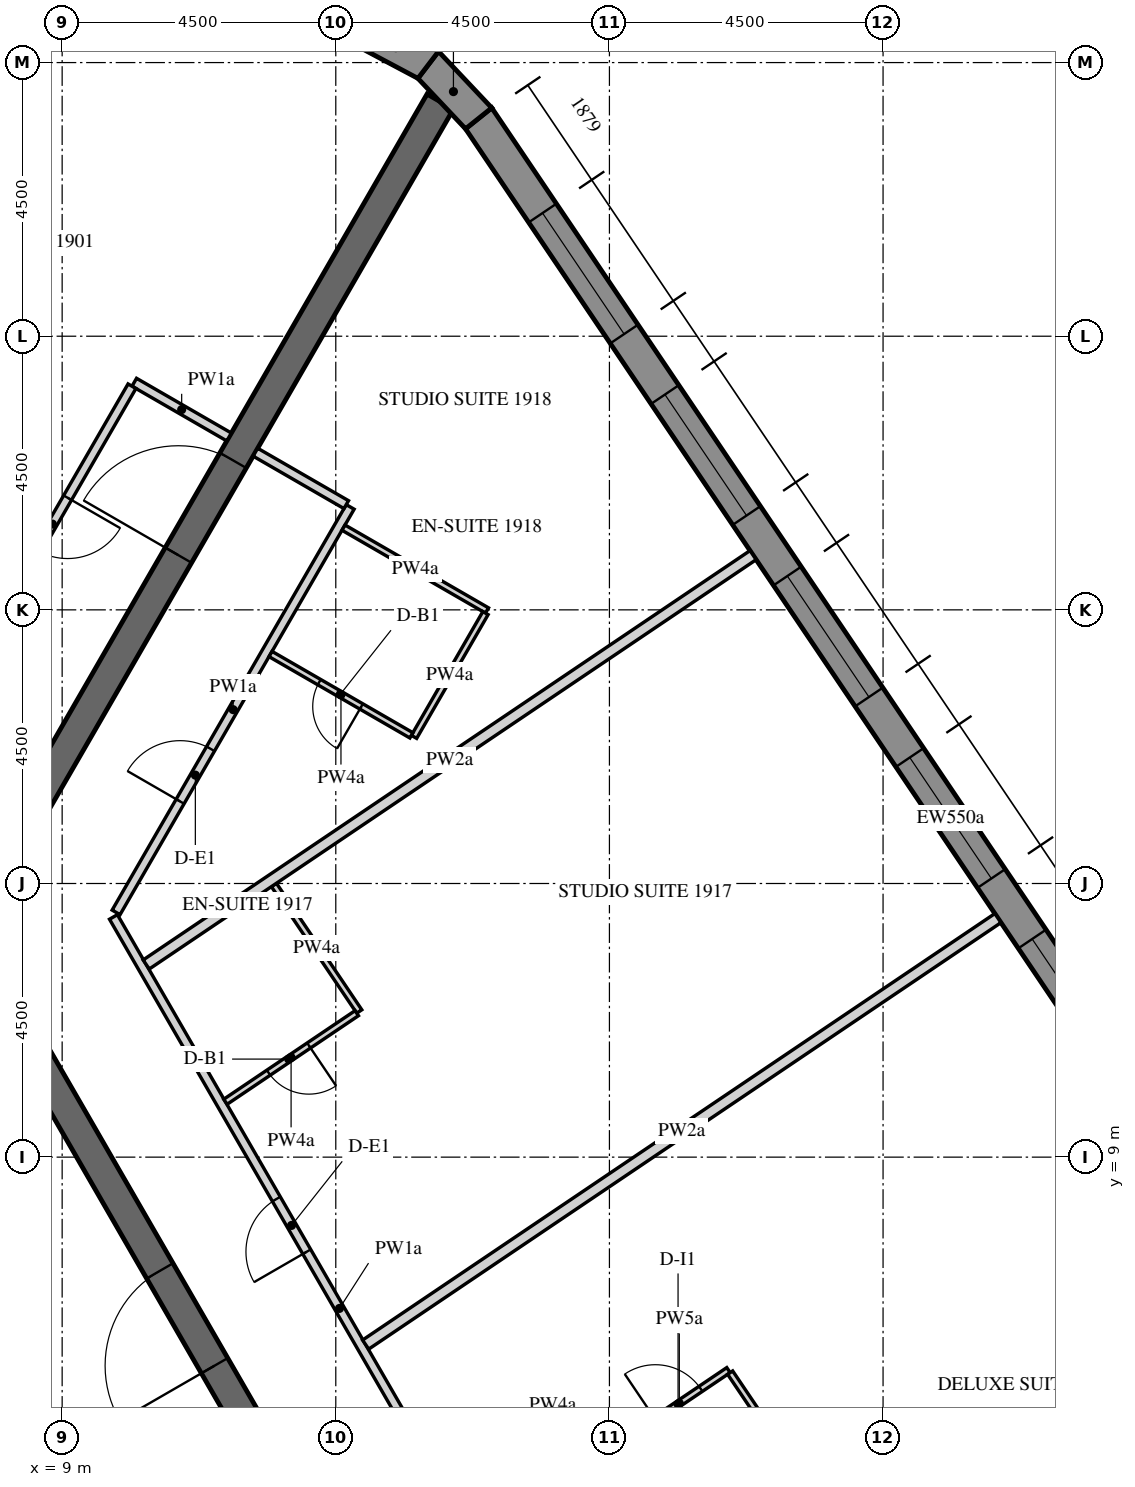
"""IFC4 building model, lengths in metres.
Left out: names, types, materials, properties, quantities, classifications, styles, units other than length and angle.
Written with IfcOpenShell. Run it as: python <this file> out.ifc"""

import sys

from ifc_helpers import new_model, si_unit, direction, frame, frame_2d, origin, place, context, subcontext, project, spatial, polyline, rectangle, outline, extrude, element, fill, save


model = new_model("IFC4")
c1 = context("Model", 3, precision=1e-05, world=origin(), true_north=direction((0.0, 1.0)))
c2 = subcontext(c1, "Body", "Model", "MODEL_VIEW")
j1 = project(units=[si_unit("LENGTHUNIT", "METRE"), si_unit("PLANEANGLEUNIT", "RADIAN")], contexts=[c1])
p1 = place(None, origin())
s1 = spatial("IfcSite", under=j1, at=p1, CompositionType="ELEMENT")
p2 = place(p1, origin())
s2 = spatial("IfcBuilding", under=s1, at=p2, CompositionType="ELEMENT")
p3 = place(p2, frame((0.0, 0.0, 246.3)))
s3 = spatial("IfcBuildingStorey", under=s2, at=p3, CompositionType="ELEMENT", Elevation=246.3)
p4 = place(p3, frame((31.371, 3.071, -0.15), z_axis=(0.0, 0.0, 1.0), x_axis=(-0.559189891278, 0.829039604297, 0.0)))
e1 = element("IfcWall", 1, at=p4, inside=s3, PredefinedType="SOLIDWALL", context=c2, shape_type="SweptSolid", body=[
    extrude(outline(polyline([(-0.026, -0.275), (27.781, -0.275), (27.736, 0.275), (0.026, 0.275), (-0.026, -0.275)])), origin(), (0.0, 0.0, 1.0), 3.75),
])
p5 = place(p4, frame((1.879, 0.0, 1.05)))
e2 = element("IfcOpeningElement", 2, at=p5, cuts=e1, PredefinedType="OPENING", context=c2, shape_type="SweptSolid", body=[
    extrude(rectangle(XDim=2.4, YDim=2.4, at=frame_2d((1.2, 1.2))), frame((0.0, 0.285, 0.0), z_axis=(0.0, -1.0, 0.0), x_axis=(1.0, 0.0, 0.0)), (0.0, 0.0, 1.0), 0.57),
])
p6 = place(p4, frame((5.479, 0.0, 1.05)))
e3 = element("IfcOpeningElement", 3, at=p6, cuts=e1, PredefinedType="OPENING", context=c2, shape_type="SweptSolid", body=[
    extrude(rectangle(XDim=2.4, YDim=2.4, at=frame_2d((1.2, 1.2))), frame((0.0, 0.285, 0.0), z_axis=(0.0, -1.0, 0.0), x_axis=(1.0, 0.0, 0.0)), (0.0, 0.0, 1.0), 0.57),
])
p7 = place(p4, frame((9.079, 0.0, 1.05)))
e4 = element("IfcOpeningElement", 4, at=p7, cuts=e1, PredefinedType="OPENING", context=c2, shape_type="SweptSolid", body=[
    extrude(rectangle(XDim=2.4, YDim=2.4, at=frame_2d((1.2, 1.2))), frame((0.0, 0.285, 0.0), z_axis=(0.0, -1.0, 0.0), x_axis=(1.0, 0.0, 0.0)), (0.0, 0.0, 1.0), 0.57),
])
p8 = place(p4, frame((12.679, 0.0, 1.05)))
e5 = element("IfcOpeningElement", 5, at=p8, cuts=e1, PredefinedType="OPENING", context=c2, shape_type="SweptSolid", body=[
    extrude(rectangle(XDim=2.4, YDim=2.4, at=frame_2d((1.2, 1.2))), frame((0.0, 0.285, 0.0), z_axis=(0.0, -1.0, 0.0), x_axis=(1.0, 0.0, 0.0)), (0.0, 0.0, 1.0), 0.57),
])
p9 = place(p4, frame((16.279, 0.0, 1.05)))
e6 = element("IfcOpeningElement", 6, at=p9, cuts=e1, PredefinedType="OPENING", context=c2, shape_type="SweptSolid", body=[
    extrude(rectangle(XDim=2.4, YDim=2.4, at=frame_2d((1.2, 1.2))), frame((0.0, 0.285, 0.0), z_axis=(0.0, -1.0, 0.0), x_axis=(1.0, 0.0, 0.0)), (0.0, 0.0, 1.0), 0.57),
])
p10 = place(p4, frame((19.879, 0.0, 1.05)))
e7 = element("IfcOpeningElement", 7, at=p10, cuts=e1, PredefinedType="OPENING", context=c2, shape_type="SweptSolid", body=[
    extrude(rectangle(XDim=2.4, YDim=2.4, at=frame_2d((1.2, 1.2))), frame((0.0, 0.285, 0.0), z_axis=(0.0, -1.0, 0.0), x_axis=(1.0, 0.0, 0.0)), (0.0, 0.0, 1.0), 0.57),
])
p11 = place(p4, frame((23.479, 0.0, 1.05)))
e8 = element("IfcOpeningElement", 8, at=p11, cuts=e1, PredefinedType="OPENING", context=c2, shape_type="SweptSolid", body=[
    extrude(rectangle(XDim=2.4, YDim=2.4, at=frame_2d((1.2, 1.2))), frame((0.0, 0.285, 0.0), z_axis=(0.0, -1.0, 0.0), x_axis=(1.0, 0.0, 0.0)), (0.0, 0.0, 1.0), 0.57),
])
p12 = place(p3, frame((15.849, 26.083, -0.15), z_axis=(0.0, 0.0, 1.0), x_axis=(-0.686196220404, 0.727416488061, 0.0)))
e9 = element("IfcWall", 9, at=p12, inside=s3, PredefinedType="SOLIDWALL", context=c2, shape_type="SweptSolid", body=[
    extrude(outline(polyline([(-0.022, -0.275), (1.253, -0.275), (1.163, 0.275), (0.022, 0.275), (-0.022, -0.275)])), origin(), (0.0, 0.0, 1.0), 3.75),
])
p13 = place(p3, frame((15.02, 26.962, -0.15), z_axis=(0.0, 0.0, 1.0), x_axis=(-0.882950818639, 0.469465495926, 0.0)))
e10 = element("IfcWall", 10, at=p13, inside=s3, PredefinedType="SOLIDWALL", context=c2, shape_type="SweptSolid", body=[
    extrude(outline(polyline([(-0.045, -0.275), (1.253, -0.275), (1.163, 0.275), (0.045, 0.275), (-0.045, -0.275)])), origin(), (0.0, 0.0, 1.0), 3.75),
])
p14 = place(p3, frame((14.722, 0.0, -0.15), z_axis=(0.0, 0.0, 1.0), x_axis=(-0.50000571537, 0.866022103989, 0.0)))
e11 = element("IfcWall", 11, at=p14, inside=s3, PredefinedType="SHEAR", context=c2, shape_type="SweptSolid", body=[
    extrude(outline(polyline([(-0.144, -0.25), (14.867, -0.25), (14.578, 0.25), (0.144, 0.25), (-0.144, -0.25)])), origin(), (0.0, 0.0, 1.0), 3.75),
])
p15 = place(p14, frame((6.432, 0.0, 0.15)))
e12 = element("IfcOpeningElement", 12, at=p15, cuts=e11, PredefinedType="OPENING", context=c2, shape_type="SweptSolid", body=[
    extrude(rectangle(XDim=1.8, YDim=2.4, at=frame_2d((0.9, 1.2))), frame((0.0, 0.26, 0.0), z_axis=(0.0, -1.0, 0.0), x_axis=(1.0, 0.0, 0.0)), (0.0, 0.0, 1.0), 0.52),
])
p16 = place(p3, frame((7.506, 13.0, -0.15), z_axis=(0.0, 0.0, 1.0), x_axis=(0.499988271576, 0.866032175087, 0.0)))
e13 = element("IfcWall", 13, at=p16, inside=s3, PredefinedType="SHEAR", context=c2, shape_type="SweptSolid", body=[
    extrude(rectangle(XDim=15.424, YDim=0.5, at=frame_2d((7.712, 0.0))), origin(), (0.0, 0.0, 1.0), 3.75),
])
p17 = place(p16, frame((6.812, 0.0, 0.15)))
e14 = element("IfcOpeningElement", 14, at=p17, cuts=e13, PredefinedType="OPENING", context=c2, shape_type="SweptSolid", body=[
    extrude(rectangle(XDim=1.8, YDim=2.4, at=frame_2d((0.9, 1.2))), frame((0.0, 0.26, 0.0), z_axis=(0.0, -1.0, 0.0), x_axis=(1.0, 0.0, 0.0)), (0.0, 0.0, 1.0), 0.52),
])
p18 = place(p3, frame((11.345, 0.0, -0.15), z_axis=(0.0, 0.0, 1.0), x_axis=(-0.499995046907, 0.866028263435, 0.0)))
e15 = element("IfcWall", 15, at=p18, inside=s3, PredefinedType="SHEAR", context=c2, shape_type="SweptSolid", body=[
    extrude(outline(polyline([(-0.101, -0.175), (11.446, -0.175), (11.244, 0.175), (0.101, 0.175), (-0.101, -0.175)])), origin(), (0.0, 0.0, 1.0), 3.75),
])
p19 = place(p18, frame((4.744, 0.0, 0.15)))
e16 = element("IfcOpeningElement", 16, at=p19, cuts=e15, PredefinedType="OPENING", context=c2, shape_type="SweptSolid", body=[
    extrude(rectangle(XDim=1.8, YDim=2.4, at=frame_2d((0.9, 1.2))), frame((0.0, 0.185, 0.0), z_axis=(0.0, -1.0, 0.0), x_axis=(1.0, 0.0, 0.0)), (0.0, 0.0, 1.0), 0.37),
])
p20 = place(p3, frame((11.745, 20.843, 0.0), z_axis=(0.0, 0.0, 1.0), x_axis=(-0.865989075817, 0.500062916607, 0.0)))
e17 = element("IfcWall", 17, at=p20, inside=s3, PredefinedType="PARTITIONING", context=c2, shape_type="SweptSolid", body=[
    extrude(rectangle(XDim=1.8, YDim=0.15, at=frame_2d((0.9, 0.0))), origin(), (0.0, 0.0, 1.0), 2.838),
])
p21 = place(p3, frame((10.149, 21.678, 0.0), z_axis=(0.0, 0.0, 1.0), x_axis=(-0.500020076982, -0.866013812023, 0.0)))
e18 = element("IfcWall", 18, at=p21, inside=s3, PredefinedType="PARTITIONING", context=c2, shape_type="SweptSolid", body=[
    extrude(rectangle(XDim=7.361, YDim=0.15, at=frame_2d((3.681, 0.0))), origin(), (0.0, 0.0, 1.0), 2.838),
])
p22 = place(p21, frame((2.118, 0.0, 0.0)))
e19 = element("IfcOpeningElement", 19, at=p22, cuts=e18, PredefinedType="OPENING", context=c2, shape_type="SweptSolid", body=[
    extrude(rectangle(XDim=1.0, YDim=2.1, at=frame_2d((0.5, 1.05))), frame((0.0, 0.085, 0.0), z_axis=(0.0, -1.0, 0.0), x_axis=(1.0, 0.0, 0.0)), (0.0, 0.0, 1.0), 0.17),
])
p23 = place(p3, frame((17.277, 0.075, 0.0), z_axis=(0.0, 0.0, 1.0), x_axis=(-0.499998228944, 0.866026426302, 0.0)))
e20 = element("IfcWall", 20, at=p23, inside=s3, PredefinedType="PARTITIONING", context=c2, shape_type="SweptSolid", body=[
    extrude(rectangle(XDim=14.867, YDim=0.15, at=frame_2d((7.433, 0.0))), origin(), (0.0, 0.0, 1.0), 2.838),
])
p24 = place(p23, frame((4.345, 0.0, 0.0)))
e21 = element("IfcOpeningElement", 21, at=p24, cuts=e20, PredefinedType="OPENING", context=c2, shape_type="SweptSolid", body=[
    extrude(rectangle(XDim=1.0, YDim=2.1, at=frame_2d((0.5, 1.05))), frame((0.0, 0.085, 0.0), z_axis=(0.0, -1.0, 0.0), x_axis=(1.0, 0.0, 0.0)), (0.0, 0.0, 1.0), 0.17),
])
p25 = place(p23, frame((8.51, 0.0, 0.0)))
e22 = element("IfcOpeningElement", 22, at=p25, cuts=e20, PredefinedType="OPENING", context=c2, shape_type="SweptSolid", body=[
    extrude(rectangle(XDim=1.0, YDim=2.1, at=frame_2d((0.5, 1.05))), frame((0.0, 0.085, 0.0), z_axis=(0.0, -1.0, 0.0), x_axis=(1.0, 0.0, 0.0)), (0.0, 0.0, 1.0), 0.17),
])
p26 = place(p3, frame((9.887, 13.025, 0.0), z_axis=(0.0, 0.0, 1.0), x_axis=(0.499985955615, 0.866033512162, 0.0)))
e23 = element("IfcWall", 23, at=p26, inside=s3, PredefinedType="PARTITIONING", context=c2, shape_type="SweptSolid", body=[
    extrude(rectangle(XDim=7.699, YDim=0.15, at=frame_2d((3.85, 0.0))), origin(), (0.0, 0.0, 1.0), 2.838),
])
p27 = place(p26, frame((2.106, 0.0, 0.0)))
e24 = element("IfcOpeningElement", 24, at=p27, cuts=e23, PredefinedType="OPENING", context=c2, shape_type="SweptSolid", body=[
    extrude(rectangle(XDim=1.0, YDim=2.1, at=frame_2d((0.5, 1.05))), frame((0.0, 0.085, 0.0), z_axis=(0.0, -1.0, 0.0), x_axis=(1.0, 0.0, 0.0)), (0.0, 0.0, 1.0), 0.17),
])
p28 = place(p3, frame((13.672, 19.73, 0.0), z_axis=(0.0, 0.0, 1.0), x_axis=(-0.866074815912, 0.499914405916, 0.0)))
e25 = element("IfcWall", 25, at=p28, inside=s3, PredefinedType="PARTITIONING", context=c2, shape_type="SweptSolid", body=[
    extrude(rectangle(XDim=1.725, YDim=0.15, at=frame_2d((0.862, 0.0))), origin(), (0.0, 0.0, 1.0), 2.838),
])
p29 = place(p3, frame((18.341, 4.407, 0.0), z_axis=(0.0, 0.0, 1.0), x_axis=(0.829014089772, 0.559227716552, 0.0)))
e26 = element("IfcWall", 26, at=p29, inside=s3, PredefinedType="PARTITIONING", context=c2, shape_type="SweptSolid", body=[
    extrude(rectangle(XDim=1.95, YDim=0.1, at=frame_2d((0.975, 0.0))), origin(), (0.0, 0.0, 1.0), 2.838),
])
p30 = place(p29, frame((0.5, 0.0, 0.0)))
e27 = element("IfcOpeningElement", 27, at=p30, cuts=e26, PredefinedType="OPENING", context=c2, shape_type="SweptSolid", body=[
    extrude(rectangle(XDim=0.9, YDim=2.1, at=frame_2d((0.45, 1.05))), frame((0.0, 0.06, 0.0), z_axis=(0.0, -1.0, 0.0), x_axis=(1.0, 0.0, 0.0)), (0.0, 0.0, 1.0), 0.12),
])
p31 = place(p3, frame((19.986, 5.456, 0.0), z_axis=(0.0, 0.0, 1.0), x_axis=(0.559223037199, -0.829017246302, 0.0)))
e28 = element("IfcWall", 28, at=p31, inside=s3, PredefinedType="PARTITIONING", context=c2, shape_type="SweptSolid", body=[
    extrude(rectangle(XDim=2.35, YDim=0.1, at=frame_2d((1.175, 0.0))), origin(), (0.0, 0.0, 1.0), 2.838),
])
p32 = place(p3, frame((24.389, 12.931, 0.0), z_axis=(0.0, 0.0, 1.0), x_axis=(-0.829040439793, -0.559188652593, 0.0)))
e29 = element("IfcWall", 29, at=p32, inside=s3, PredefinedType="PARTITIONING", context=c2, shape_type="SweptSolid", body=[
    extrude(rectangle(XDim=12.542, YDim=0.18, at=frame_2d((6.271, 0.0))), origin(), (0.0, 0.0, 1.0), 2.838),
])
p33 = place(p3, frame((12.483, 13.476, 0.0), z_axis=(0.0, 0.0, 1.0), x_axis=(0.559203861497, -0.829030181168, 0.0)))
e30 = element("IfcWall", 30, at=p33, inside=s3, PredefinedType="PARTITIONING", context=c2, shape_type="SweptSolid", body=[
    extrude(rectangle(XDim=2.51, YDim=0.1, at=frame_2d((1.255, 0.0))), origin(), (0.0, 0.0, 1.0), 2.838),
])
p34 = place(p3, frame((13.845, 11.367, 0.0), z_axis=(0.0, 0.0, 1.0), x_axis=(-0.829068087245, -0.55914766092, 0.0)))
e31 = element("IfcWall", 31, at=p34, inside=s3, PredefinedType="PARTITIONING", context=c2, shape_type="SweptSolid", body=[
    extrude(rectangle(XDim=2.605, YDim=0.1, at=frame_2d((1.302, 0.0))), origin(), (0.0, 0.0, 1.0), 2.838),
])
p35 = place(p34, frame((0.95, 0.0, 0.0)))
e32 = element("IfcOpeningElement", 32, at=p35, cuts=e31, PredefinedType="OPENING", context=c2, shape_type="SweptSolid", body=[
    extrude(rectangle(XDim=0.8, YDim=2.1, at=frame_2d((0.4, 1.05))), frame((0.0, 0.06, 0.0), z_axis=(0.0, -1.0, 0.0), x_axis=(1.0, 0.0, 0.0)), (0.0, 0.0, 1.0), 0.12),
])
p36 = place(p3, frame((20.363, 18.9, 0.0), z_axis=(0.0, 0.0, 1.0), x_axis=(-0.829027307641, -0.559208121531, 0.0)))
e33 = element("IfcWall", 33, at=p36, inside=s3, PredefinedType="PARTITIONING", context=c2, shape_type="SweptSolid", body=[
    extrude(rectangle(XDim=12.039, YDim=0.18, at=frame_2d((6.02, 0.0))), origin(), (0.0, 0.0, 1.0), 2.838),
])
p37 = place(p3, frame((13.627, 19.352, 0.0), z_axis=(0.0, 0.0, 1.0), x_axis=(0.866012511928, -0.500022328685, 0.0)))
e34 = element("IfcWall", 34, at=p37, inside=s3, PredefinedType="PARTITIONING", context=c2, shape_type="SweptSolid", body=[
    extrude(rectangle(XDim=2.725, YDim=0.1, at=frame_2d((1.363, 0.0))), origin(), (0.0, 0.0, 1.0), 2.838),
])
p38 = place(p3, frame((15.962, 17.947, 0.0), z_axis=(0.0, 0.0, 1.0), x_axis=(-0.500016218704, -0.866016039709, 0.0)))
e35 = element("IfcWall", 35, at=p38, inside=s3, PredefinedType="PARTITIONING", context=c2, shape_type="SweptSolid", body=[
    extrude(rectangle(XDim=2.35, YDim=0.1, at=frame_2d((1.175, 0.0))), origin(), (0.0, 0.0, 1.0), 2.838),
])
p39 = place(p3, frame((14.743, 15.936, 0.0), z_axis=(0.0, 0.0, 1.0), x_axis=(-0.86604424267, 0.499967368674, 0.0)))
e36 = element("IfcWall", 36, at=p39, inside=s3, PredefinedType="PARTITIONING", context=c2, shape_type="SweptSolid", body=[
    extrude(rectangle(XDim=2.675, YDim=0.1, at=frame_2d((1.337, 0.0))), origin(), (0.0, 0.0, 1.0), 2.838),
])
p40 = place(p39, frame((0.95, 0.0, 0.0)))
e37 = element("IfcOpeningElement", 37, at=p40, cuts=e36, PredefinedType="OPENING", context=c2, shape_type="SweptSolid", body=[
    extrude(rectangle(XDim=0.8, YDim=2.1, at=frame_2d((0.4, 1.05))), frame((0.0, 0.06, 0.0), z_axis=(0.0, -1.0, 0.0), x_axis=(1.0, 0.0, 0.0)), (0.0, 0.0, 1.0), 0.12),
])
p41 = place(p7, frame((0.0, 0.205, 0.0)))
e38 = element("IfcWindow", 38, at=p41, inside=s3, PartitioningType="DOUBLE_PANEL_VERTICAL", PredefinedType="WINDOW", context=c2, shape_type="SweptSolid", body=[
    extrude(rectangle(XDim=2.4, YDim=2.4, at=frame_2d((1.2, 1.2))), frame((0.0, 0.03, 0.0), z_axis=(0.0, -1.0, 0.0), x_axis=(1.0, 0.0, 0.0)), (0.0, 0.0, 1.0), 0.06),
])
fill(e4, e38)
p42 = place(p8, frame((0.0, 0.205, 0.0)))
e39 = element("IfcWindow", 39, at=p42, inside=s3, PartitioningType="DOUBLE_PANEL_VERTICAL", PredefinedType="WINDOW", context=c2, shape_type="SweptSolid", body=[
    extrude(rectangle(XDim=2.4, YDim=2.4, at=frame_2d((1.2, 1.2))), frame((0.0, 0.03, 0.0), z_axis=(0.0, -1.0, 0.0), x_axis=(1.0, 0.0, 0.0)), (0.0, 0.0, 1.0), 0.06),
])
fill(e5, e39)
p43 = place(p9, frame((0.0, 0.205, 0.0)))
e40 = element("IfcWindow", 40, at=p43, inside=s3, PartitioningType="DOUBLE_PANEL_VERTICAL", PredefinedType="WINDOW", context=c2, shape_type="SweptSolid", body=[
    extrude(rectangle(XDim=2.4, YDim=2.4, at=frame_2d((1.2, 1.2))), frame((0.0, 0.03, 0.0), z_axis=(0.0, -1.0, 0.0), x_axis=(1.0, 0.0, 0.0)), (0.0, 0.0, 1.0), 0.06),
])
fill(e6, e40)
p44 = place(p10, frame((0.0, 0.205, 0.0)))
e41 = element("IfcWindow", 41, at=p44, inside=s3, PartitioningType="DOUBLE_PANEL_VERTICAL", PredefinedType="WINDOW", context=c2, shape_type="SweptSolid", body=[
    extrude(rectangle(XDim=2.4, YDim=2.4, at=frame_2d((1.2, 1.2))), frame((0.0, 0.03, 0.0), z_axis=(0.0, -1.0, 0.0), x_axis=(1.0, 0.0, 0.0)), (0.0, 0.0, 1.0), 0.06),
])
fill(e7, e41)
p45 = place(p11, frame((0.0, 0.205, 0.0)))
e42 = element("IfcWindow", 42, at=p45, inside=s3, PartitioningType="DOUBLE_PANEL_VERTICAL", PredefinedType="WINDOW", context=c2, shape_type="SweptSolid", body=[
    extrude(rectangle(XDim=2.4, YDim=2.4, at=frame_2d((1.2, 1.2))), frame((0.0, 0.03, 0.0), z_axis=(0.0, -1.0, 0.0), x_axis=(1.0, 0.0, 0.0)), (0.0, 0.0, 1.0), 0.06),
])
fill(e8, e42)
p46 = place(p15, origin())
e43 = element("IfcDoor", 43, at=p46, inside=s3, OperationType="DOUBLE_DOOR_SINGLE_SWING", PredefinedType="DOOR", context=c2, shape_type="SweptSolid", body=[
    extrude(rectangle(XDim=1.8, YDim=2.4, at=frame_2d((0.9, 1.2))), frame((0.0, 0.025, 0.0), z_axis=(0.0, -1.0, 0.0), x_axis=(1.0, 0.0, 0.0)), (0.0, 0.0, 1.0), 0.05),
])
fill(e12, e43)
p47 = place(p17, origin())
e44 = element("IfcDoor", 44, at=p47, inside=s3, OperationType="DOUBLE_DOOR_SINGLE_SWING", PredefinedType="DOOR", context=c2, shape_type="SweptSolid", body=[
    extrude(rectangle(XDim=1.8, YDim=2.4, at=frame_2d((0.9, 1.2))), frame((0.0, 0.025, 0.0), z_axis=(0.0, -1.0, 0.0), x_axis=(1.0, 0.0, 0.0)), (0.0, 0.0, 1.0), 0.05),
])
fill(e14, e44)
p48 = place(p19, origin())
e45 = element("IfcDoor", 45, at=p48, inside=s3, OperationType="DOUBLE_DOOR_SINGLE_SWING", PredefinedType="DOOR", context=c2, shape_type="SweptSolid", body=[
    extrude(rectangle(XDim=1.8, YDim=2.4, at=frame_2d((0.9, 1.2))), frame((0.0, 0.025, 0.0), z_axis=(0.0, -1.0, 0.0), x_axis=(1.0, 0.0, 0.0)), (0.0, 0.0, 1.0), 0.05),
])
fill(e16, e45)
p49 = place(p22, origin())
e46 = element("IfcDoor", 46, at=p49, inside=s3, OperationType="SINGLE_SWING_LEFT", PredefinedType="DOOR", context=c2, shape_type="SweptSolid", body=[
    extrude(rectangle(XDim=1.0, YDim=2.1, at=frame_2d((0.5, 1.05))), frame((0.0, 0.025, 0.0), z_axis=(0.0, -1.0, 0.0), x_axis=(1.0, 0.0, 0.0)), (0.0, 0.0, 1.0), 0.05),
])
fill(e19, e46)
p50 = place(p30, origin())
e47 = element("IfcDoor", 47, at=p50, inside=s3, OperationType="SINGLE_SWING_RIGHT", PredefinedType="DOOR", context=c2, shape_type="SweptSolid", body=[
    extrude(rectangle(XDim=0.9, YDim=2.1, at=frame_2d((0.45, 1.05))), frame((0.0, 0.025, 0.0), z_axis=(0.0, -1.0, 0.0), x_axis=(1.0, 0.0, 0.0)), (0.0, 0.0, 1.0), 0.05),
])
fill(e27, e47)
p51 = place(p25, origin())
e48 = element("IfcDoor", 48, at=p51, inside=s3, OperationType="SINGLE_SWING_RIGHT", PredefinedType="DOOR", context=c2, shape_type="SweptSolid", body=[
    extrude(rectangle(XDim=1.0, YDim=2.1, at=frame_2d((0.5, 1.05))), frame((0.0, 0.025, 0.0), z_axis=(0.0, -1.0, 0.0), x_axis=(1.0, 0.0, 0.0)), (0.0, 0.0, 1.0), 0.05),
])
fill(e22, e48)
p52 = place(p35, origin())
e49 = element("IfcDoor", 49, at=p52, inside=s3, OperationType="SINGLE_SWING_LEFT", PredefinedType="DOOR", context=c2, shape_type="SweptSolid", body=[
    extrude(rectangle(XDim=0.8, YDim=2.1, at=frame_2d((0.4, 1.05))), frame((0.0, 0.025, 0.0), z_axis=(0.0, -1.0, 0.0), x_axis=(1.0, 0.0, 0.0)), (0.0, 0.0, 1.0), 0.05),
])
fill(e32, e49)
p53 = place(p27, origin())
e50 = element("IfcDoor", 50, at=p53, inside=s3, OperationType="SINGLE_SWING_RIGHT", PredefinedType="DOOR", context=c2, shape_type="SweptSolid", body=[
    extrude(rectangle(XDim=1.0, YDim=2.1, at=frame_2d((0.5, 1.05))), frame((0.0, 0.025, 0.0), z_axis=(0.0, -1.0, 0.0), x_axis=(1.0, 0.0, 0.0)), (0.0, 0.0, 1.0), 0.05),
])
fill(e24, e50)
p54 = place(p40, origin())
e51 = element("IfcDoor", 51, at=p54, inside=s3, OperationType="SINGLE_SWING_RIGHT", PredefinedType="DOOR", context=c2, shape_type="SweptSolid", body=[
    extrude(rectangle(XDim=0.8, YDim=2.1, at=frame_2d((0.4, 1.05))), frame((0.0, 0.025, 0.0), z_axis=(0.0, -1.0, 0.0), x_axis=(1.0, 0.0, 0.0)), (0.0, 0.0, 1.0), 0.05),
])
fill(e37, e51)
save(model, sys.argv[1])
